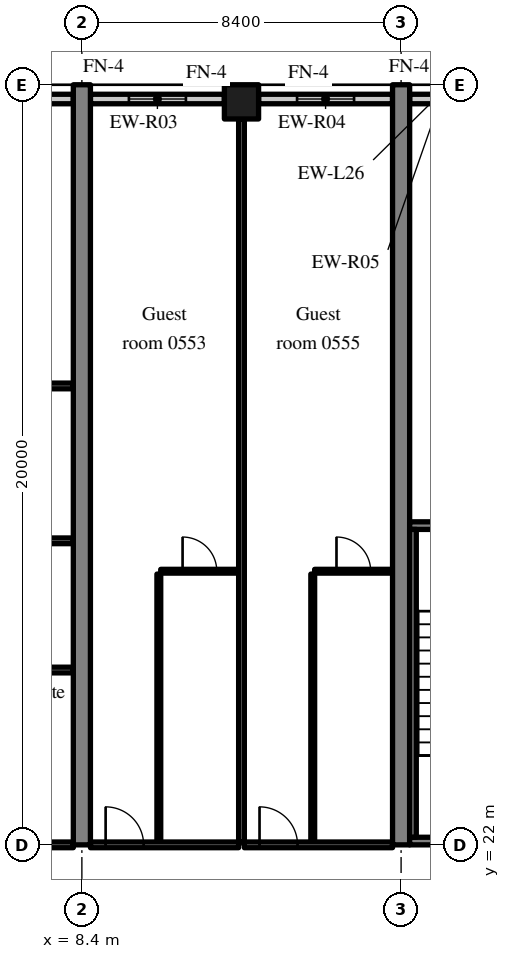
"""IFC4 building model, lengths in metres.
Left out: names, types, materials, properties, quantities, classifications, styles, units other than length and angle.
Written with IfcOpenShell. Run it as: python <this file> out.ifc"""

import sys

from ifc_helpers import new_model, si_unit, direction, frame, frame_2d, origin, origin_2d, place, context, subcontext, project, spatial, rectangle, extrude, source, transform, mapped, element, fill, save


model = new_model("IFC4")
c1 = context("Model", 3, precision=1e-05, world=origin(), true_north=direction((0.0, 1.0)))
c2 = subcontext(c1, "Body", "Model", "MODEL_VIEW")
j1 = project(units=[si_unit("LENGTHUNIT", "METRE"), si_unit("PLANEANGLEUNIT", "RADIAN")], contexts=[c1])
p1 = place(None, origin())
s1 = spatial("IfcSite", under=j1, at=p1, CompositionType="ELEMENT")
p2 = place(p1, origin())
s2 = spatial("IfcBuilding", under=s1, at=p2, CompositionType="ELEMENT")
p3 = place(p2, frame((0.0, 0.0, 27.8)))
s3 = spatial("IfcBuildingStorey", under=s2, at=p3, CompositionType="ELEMENT", Elevation=27.8)
m1 = source(origin(), c2, "Body", "SweptSolid", [
    extrude(rectangle(XDim=20.0, YDim=0.45, at=frame_2d((10.0, 0.0))), origin(), (0.0, 0.0, 1.0), 3.52),
])
for number, where, z_axis, x_axis in (
    (1, (8.4, 22.0, 0.0), (0.0, 0.0, 1.0), (0.0, 1.0, 0.0)),
    (2, (16.8, 22.0, 0.0), (0.0, 0.0, 1.0), (0.0, 1.0, 0.0)),
):
    element("IfcWall", number, at=place(p3, frame(where, z_axis=z_axis, x_axis=x_axis)), inside=s3, PredefinedType="SHEAR", context=c2, shape_type="MappedRepresentation", body=[
        mapped(m1, transform((0.0, 0.0, 0.0), scale=1.0)),
    ])
m2 = source(origin(), c2, "Body", "SweptSolid", [
    extrude(rectangle(XDim=0.9, YDim=0.9, at=origin_2d()), origin(), (0.0, 0.0, 1.0), 3.52),
])
p4 = place(p3, frame((12.6, 41.55, 0.0), z_axis=(0.0, 0.0, 1.0), x_axis=(1.0, 0.0, 0.0)))
e3 = element("IfcColumn", 3, at=p4, inside=s3, PredefinedType="COLUMN", context=c2, shape_type="MappedRepresentation", body=[
    mapped(m2, transform((0.0, 0.0, 0.0), scale=1.0)),
])
m3 = source(origin(), c2, "Body", "SweptSolid", [
    extrude(rectangle(XDim=4.02, YDim=0.25, at=frame_2d((2.01, 0.0))), origin(), (0.0, 0.0, 1.0), 2.77),
])
p5 = place(p3, frame((8.175, 41.625, 0.0), z_axis=(0.0, 0.0, 1.0), x_axis=(-1.0, 0.0, 0.0)))
e4 = element("IfcWall", 4, at=p5, inside=s3, PredefinedType="SOLIDWALL", context=c2, shape_type="MappedRepresentation", body=[
    mapped(m3, transform((0.0, 0.0, 0.0), scale=1.0)),
])
m4 = source(origin(), c2, "Body", "SweptSolid", [
    extrude(rectangle(XDim=1.5, YDim=1.5, at=frame_2d((0.75, 0.75))), frame((0.0, 0.135, 0.0), z_axis=(0.0, -1.0, 0.0), x_axis=(1.0, 0.0, 0.0)), (0.0, 0.0, 1.0), 0.27),
])
p6 = place(p5, frame((1.26, 0.0, 0.9)))
e5 = element("IfcOpeningElement", 5, at=p6, cuts=e4, PredefinedType="OPENING", context=c2, shape_type="MappedRepresentation", body=[
    mapped(m4, transform((0.0, 0.0, 0.0), scale=1.0)),
])
m5 = source(origin(), c2, "Body", "SweptSolid", [
    extrude(rectangle(XDim=3.525, YDim=0.25, at=frame_2d((1.762, 0.0))), origin(), (0.0, 0.0, 1.0), 2.77),
])
p7 = place(p3, frame((12.15, 41.625, 0.0), z_axis=(0.0, 0.0, 1.0), x_axis=(-1.0, 0.0, 0.0)))
e6 = element("IfcWall", 6, at=p7, inside=s3, PredefinedType="SOLIDWALL", context=c2, shape_type="MappedRepresentation", body=[
    mapped(m5, transform((0.0, 0.0, 0.0), scale=1.0)),
])
p8 = place(p7, frame((1.012, 0.0, 0.9)))
e7 = element("IfcOpeningElement", 7, at=p8, cuts=e6, PredefinedType="OPENING", context=c2, shape_type="MappedRepresentation", body=[
    mapped(m4, transform((0.0, 0.0, 0.0), scale=1.0)),
])
p9 = place(p3, frame((16.575, 41.625, 0.0), z_axis=(0.0, 0.0, 1.0), x_axis=(-1.0, 0.0, 0.0)))
e8 = element("IfcWall", 8, at=p9, inside=s3, PredefinedType="SOLIDWALL", context=c2, shape_type="MappedRepresentation", body=[
    mapped(m5, transform((0.0, 0.0, 0.0), scale=1.0)),
])
p10 = place(p9, frame((1.012, 0.0, 0.9)))
e9 = element("IfcOpeningElement", 9, at=p10, cuts=e8, PredefinedType="OPENING", context=c2, shape_type="MappedRepresentation", body=[
    mapped(m4, transform((0.0, 0.0, 0.0), scale=1.0)),
])
m6 = source(origin(), c2, "Body", "SweptSolid", [
    extrude(rectangle(XDim=1.633, YDim=0.25, at=frame_2d((0.816, 0.0))), origin(), (0.0, 0.0, 1.0), 2.77),
])
p11 = place(p3, frame((18.658, 41.625, 0.0), z_axis=(0.0, 0.0, 1.0), x_axis=(-1.0, 0.0, 0.0)))
e10 = element("IfcWall", 10, at=p11, inside=s3, PredefinedType="SOLIDWALL", context=c2, shape_type="MappedRepresentation", body=[
    mapped(m6, transform((0.0, 0.0, 0.0), scale=1.0)),
])
m7 = source(origin(), c2, "Body", "SweptSolid", [
    extrude(rectangle(XDim=8.175, YDim=0.2, at=frame_2d((4.087, 0.0))), origin(), (0.0, 0.0, 1.0), 3.52),
])
p12 = place(p3, frame((17.025, 22.1, 0.0), z_axis=(0.0, 0.0, 1.0), x_axis=(1.0, 0.0, 0.0)))
e11 = element("IfcWall", 11, at=p12, inside=s3, PredefinedType="SOLIDWALL", context=c2, shape_type="MappedRepresentation", body=[
    mapped(m7, transform((0.0, 0.0, 0.0), scale=1.0)),
])
m8 = source(origin(), c2, "Body", "SweptSolid", [
    extrude(rectangle(XDim=1.2, YDim=2.1, at=frame_2d((0.6, 1.05))), frame((0.0, 0.11, 0.0), z_axis=(0.0, -1.0, 0.0), x_axis=(1.0, 0.0, 0.0)), (0.0, 0.0, 1.0), 0.22),
])
p13 = place(p12, frame((5.975, 0.0, 0.0)))
e12 = element("IfcOpeningElement", 12, at=p13, cuts=e11, PredefinedType="OPENING", context=c2, shape_type="MappedRepresentation", body=[
    mapped(m8, transform((0.0, 0.0, 0.0), scale=1.0)),
])
p14 = place(p3, frame((17.025, 30.4, 0.0), z_axis=(0.0, 0.0, 1.0), x_axis=(1.0, 0.0, 0.0)))
e13 = element("IfcWall", 13, at=p14, inside=s3, PredefinedType="SOLIDWALL", context=c2, shape_type="MappedRepresentation", body=[
    mapped(m7, transform((0.0, 0.0, 0.0), scale=1.0)),
])
m9 = source(origin(), c2, "Body", "SweptSolid", [
    extrude(rectangle(XDim=1.0, YDim=2.1, at=frame_2d((0.5, 1.05))), frame((0.0, 0.11, 0.0), z_axis=(0.0, -1.0, 0.0), x_axis=(1.0, 0.0, 0.0)), (0.0, 0.0, 1.0), 0.22),
])
p15 = place(p14, frame((6.075, 0.0, 0.0)))
e14 = element("IfcOpeningElement", 14, at=p15, cuts=e13, PredefinedType="OPENING", context=c2, shape_type="MappedRepresentation", body=[
    mapped(m9, transform((0.0, 0.0, 0.0), scale=1.0)),
])
m10 = source(origin(), c2, "Body", "SweptSolid", [
    extrude(rectangle(XDim=8.1, YDim=0.175, at=frame_2d((4.05, 0.0))), origin(), (0.0, 0.0, 1.0), 3.52),
])
p16 = place(p3, frame((17.112, 22.2, 0.0), z_axis=(0.0, 0.0, 1.0), x_axis=(0.0, 1.0, 0.0)))
e15 = element("IfcWall", 15, at=p16, inside=s3, PredefinedType="SOLIDWALL", context=c2, shape_type="MappedRepresentation", body=[
    mapped(m10, transform((0.0, 0.0, 0.0), scale=1.0)),
])
m11 = source(origin(), c2, "Body", "SweptSolid", [
    extrude(rectangle(XDim=5.175, YDim=0.15, at=frame_2d((2.587, 0.0))), origin(), (0.0, 0.0, 1.0), 2.82),
])
p17 = place(p3, frame((3.0, 22.0, 0.0), z_axis=(0.0, 0.0, 1.0), x_axis=(1.0, 0.0, 0.0)))
e16 = element("IfcWall", 16, at=p17, inside=s3, PredefinedType="PARTITIONING", context=c2, shape_type="MappedRepresentation", body=[
    mapped(m11, transform((0.0, 0.0, 0.0), scale=1.0)),
])
m12 = source(origin(), c2, "Body", "SweptSolid", [
    extrude(rectangle(XDim=5.175, YDim=0.15, at=frame_2d((2.587, 0.0))), origin(), (0.0, 0.0, 1.0), 3.52),
])
for number, where, z_axis, x_axis in (
    (17, (3.0, 26.6, 0.0), (0.0, 0.0, 1.0), (1.0, 0.0, 0.0)),
    (18, (3.0, 30.0, 0.0), (0.0, 0.0, 1.0), (1.0, 0.0, 0.0)),
):
    element("IfcWall", number, at=place(p3, frame(where, z_axis=z_axis, x_axis=x_axis)), inside=s3, PredefinedType="PARTITIONING", context=c2, shape_type="MappedRepresentation", body=[
        mapped(m12, transform((0.0, 0.0, 0.0), scale=1.0)),
    ])
m13 = source(origin(), c2, "Body", "SweptSolid", [
    extrude(rectangle(XDim=7.725, YDim=0.15, at=frame_2d((3.863, 0.0))), origin(), (0.0, 0.0, 1.0), 3.52),
])
p18 = place(p3, frame((0.45, 34.075, 0.0), z_axis=(0.0, 0.0, 1.0), x_axis=(1.0, 0.0, 0.0)))
e19 = element("IfcWall", 19, at=p18, inside=s3, PredefinedType="PARTITIONING", context=c2, shape_type="MappedRepresentation", body=[
    mapped(m13, transform((0.0, 0.0, 0.0), scale=1.0)),
])
m14 = source(origin(), c2, "Body", "SweptSolid", [
    extrude(rectangle(XDim=1.0, YDim=2.1, at=frame_2d((0.5, 1.05))), frame((0.0, 0.085, 0.0), z_axis=(0.0, -1.0, 0.0), x_axis=(1.0, 0.0, 0.0)), (0.0, 0.0, 1.0), 0.17),
])
p19 = place(p18, frame((0.7, 0.0, 0.0)))
e20 = element("IfcOpeningElement", 20, at=p19, cuts=e19, PredefinedType="OPENING", context=c2, shape_type="MappedRepresentation", body=[
    mapped(m14, transform((0.0, 0.0, 0.0), scale=1.0)),
])
m15 = source(origin(), c2, "Body", "SweptSolid", [
    extrude(rectangle(XDim=7.05, YDim=0.1, at=frame_2d((3.525, 0.0))), origin(), (0.0, 0.0, 1.0), 3.52),
])
p20 = place(p3, frame((10.425, 22.075, 0.0), z_axis=(0.0, 0.0, 1.0), x_axis=(0.0, 1.0, 0.0)))
e21 = element("IfcWall", 21, at=p20, inside=s3, PredefinedType="PARTITIONING", context=c2, shape_type="MappedRepresentation", body=[
    mapped(m15, transform((0.0, 0.0, 0.0), scale=1.0)),
])
m16 = source(origin(), c2, "Body", "SweptSolid", [
    extrude(rectangle(XDim=2.05, YDim=0.1, at=frame_2d((1.025, 0.0))), origin(), (0.0, 0.0, 1.0), 3.52),
])
p21 = place(p3, frame((10.475, 29.2, 0.0), z_axis=(0.0, 0.0, 1.0), x_axis=(1.0, 0.0, 0.0)))
e22 = element("IfcWall", 22, at=p21, inside=s3, PredefinedType="PARTITIONING", context=c2, shape_type="MappedRepresentation", body=[
    mapped(m16, transform((0.0, 0.0, 0.0), scale=1.0)),
])
m17 = source(origin(), c2, "Body", "SweptSolid", [
    extrude(rectangle(XDim=0.9, YDim=2.1, at=frame_2d((0.45, 1.05))), frame((0.0, 0.06, 0.0), z_axis=(0.0, -1.0, 0.0), x_axis=(1.0, 0.0, 0.0)), (0.0, 0.0, 1.0), 0.12),
])
p22 = place(p21, frame((0.575, 0.0, 0.0)))
e23 = element("IfcOpeningElement", 23, at=p22, cuts=e22, PredefinedType="OPENING", context=c2, shape_type="MappedRepresentation", body=[
    mapped(m17, transform((0.0, 0.0, 0.0), scale=1.0)),
])
m18 = source(origin(), c2, "Body", "SweptSolid", [
    extrude(rectangle(XDim=3.9, YDim=0.15, at=frame_2d((1.95, 0.0))), origin(), (0.0, 0.0, 1.0), 2.82),
])
p23 = place(p3, frame((8.625, 22.0, 0.0), z_axis=(0.0, 0.0, 1.0), x_axis=(1.0, 0.0, 0.0)))
e24 = element("IfcWall", 24, at=p23, inside=s3, PredefinedType="PARTITIONING", context=c2, shape_type="MappedRepresentation", body=[
    mapped(m18, transform((0.0, 0.0, 0.0), scale=1.0)),
])
p24 = place(p23, frame((0.4, 0.0, 0.0)))
e25 = element("IfcOpeningElement", 25, at=p24, cuts=e24, PredefinedType="OPENING", context=c2, shape_type="MappedRepresentation", body=[
    mapped(m14, transform((0.0, 0.0, 0.0), scale=1.0)),
])
p25 = place(p3, frame((14.475, 22.075, 0.0), z_axis=(0.0, 0.0, 1.0), x_axis=(0.0, 1.0, 0.0)))
e26 = element("IfcWall", 26, at=p25, inside=s3, PredefinedType="PARTITIONING", context=c2, shape_type="MappedRepresentation", body=[
    mapped(m15, transform((0.0, 0.0, 0.0), scale=1.0)),
])
m19 = source(origin(), c2, "Body", "SweptSolid", [
    extrude(rectangle(XDim=2.05, YDim=0.1, at=frame_2d((1.025, 0.0))), origin(), (0.0, 0.0, 1.0), 3.52),
])
p26 = place(p3, frame((14.525, 29.2, 0.0), z_axis=(0.0, 0.0, 1.0), x_axis=(1.0, 0.0, 0.0)))
e27 = element("IfcWall", 27, at=p26, inside=s3, PredefinedType="PARTITIONING", context=c2, shape_type="MappedRepresentation", body=[
    mapped(m19, transform((0.0, 0.0, 0.0), scale=1.0)),
])
p27 = place(p26, frame((0.575, 0.0, 0.0)))
e28 = element("IfcOpeningElement", 28, at=p27, cuts=e27, PredefinedType="OPENING", context=c2, shape_type="MappedRepresentation", body=[
    mapped(m17, transform((0.0, 0.0, 0.0), scale=1.0)),
])
p28 = place(p3, frame((12.675, 22.0, 0.0), z_axis=(0.0, 0.0, 1.0), x_axis=(1.0, 0.0, 0.0)))
e29 = element("IfcWall", 29, at=p28, inside=s3, PredefinedType="PARTITIONING", context=c2, shape_type="MappedRepresentation", body=[
    mapped(m18, transform((0.0, 0.0, 0.0), scale=1.0)),
])
p29 = place(p28, frame((0.4, 0.0, 0.0)))
e30 = element("IfcOpeningElement", 30, at=p29, cuts=e29, PredefinedType="OPENING", context=c2, shape_type="MappedRepresentation", body=[
    mapped(m14, transform((0.0, 0.0, 0.0), scale=1.0)),
])
m20 = source(origin(), c2, "Body", "SweptSolid", [
    extrude(rectangle(XDim=19.025, YDim=0.15, at=frame_2d((9.513, 0.0))), origin(), (0.0, 0.0, 1.0), 3.52),
])
p30 = place(p3, frame((12.6, 22.075, 0.0), z_axis=(0.0, 0.0, 1.0), x_axis=(0.0, 1.0, 0.0)))
e31 = element("IfcWall", 31, at=p30, inside=s3, PredefinedType="PARTITIONING", context=c2, shape_type="MappedRepresentation", body=[
    mapped(m20, transform((0.0, 0.0, 0.0), scale=1.0)),
])
m21 = source(origin(), c2, "Body", "SweptSolid", [
    extrude(rectangle(XDim=1.5, YDim=1.5, at=frame_2d((0.75, 0.75))), frame((0.0, 0.03, 0.0), z_axis=(0.0, -1.0, 0.0), x_axis=(1.0, 0.0, 0.0)), (0.0, 0.0, 1.0), 0.06),
])
p31 = place(p8, origin())
e32 = element("IfcWindow", 32, at=p31, inside=s3, PartitioningType="SINGLE_PANEL", PredefinedType="WINDOW", context=c2, shape_type="MappedRepresentation", body=[
    mapped(m21, transform((0.0, 0.0, 0.0), scale=1.0)),
])
fill(e7, e32)
p32 = place(p10, origin())
e33 = element("IfcWindow", 33, at=p32, inside=s3, PartitioningType="SINGLE_PANEL", PredefinedType="WINDOW", context=c2, shape_type="MappedRepresentation", body=[
    mapped(m21, transform((0.0, 0.0, 0.0), scale=1.0)),
])
fill(e9, e33)
m22 = source(origin(), c2, "Body", "SweptSolid", [
    extrude(rectangle(XDim=0.9, YDim=2.1, at=frame_2d((0.45, 1.05))), frame((0.0, 0.025, 0.0), z_axis=(0.0, -1.0, 0.0), x_axis=(1.0, 0.0, 0.0)), (0.0, 0.0, 1.0), 0.05),
])
p33 = place(p22, origin())
e34 = element("IfcDoor", 34, at=p33, inside=s3, OperationType="SINGLE_SWING_LEFT", PredefinedType="DOOR", context=c2, shape_type="MappedRepresentation", body=[
    mapped(m22, transform((0.0, 0.0, 0.0), scale=1.0)),
])
fill(e23, e34)
m23 = source(origin(), c2, "Body", "SweptSolid", [
    extrude(rectangle(XDim=1.0, YDim=2.1, at=frame_2d((0.5, 1.05))), frame((0.0, 0.025, 0.0), z_axis=(0.0, -1.0, 0.0), x_axis=(1.0, 0.0, 0.0)), (0.0, 0.0, 1.0), 0.05),
])
p34 = place(p24, origin())
e35 = element("IfcDoor", 35, at=p34, inside=s3, OperationType="SINGLE_SWING_LEFT", PredefinedType="DOOR", context=c2, shape_type="MappedRepresentation", body=[
    mapped(m23, transform((0.0, 0.0, 0.0), scale=1.0)),
])
fill(e25, e35)
p35 = place(p27, origin())
e36 = element("IfcDoor", 36, at=p35, inside=s3, OperationType="SINGLE_SWING_LEFT", PredefinedType="DOOR", context=c2, shape_type="MappedRepresentation", body=[
    mapped(m22, transform((0.0, 0.0, 0.0), scale=1.0)),
])
fill(e28, e36)
p36 = place(p29, origin())
e37 = element("IfcDoor", 37, at=p36, inside=s3, OperationType="SINGLE_SWING_LEFT", PredefinedType="DOOR", context=c2, shape_type="MappedRepresentation", body=[
    mapped(m23, transform((0.0, 0.0, 0.0), scale=1.0)),
])
fill(e30, e37)
save(model, sys.argv[1])
